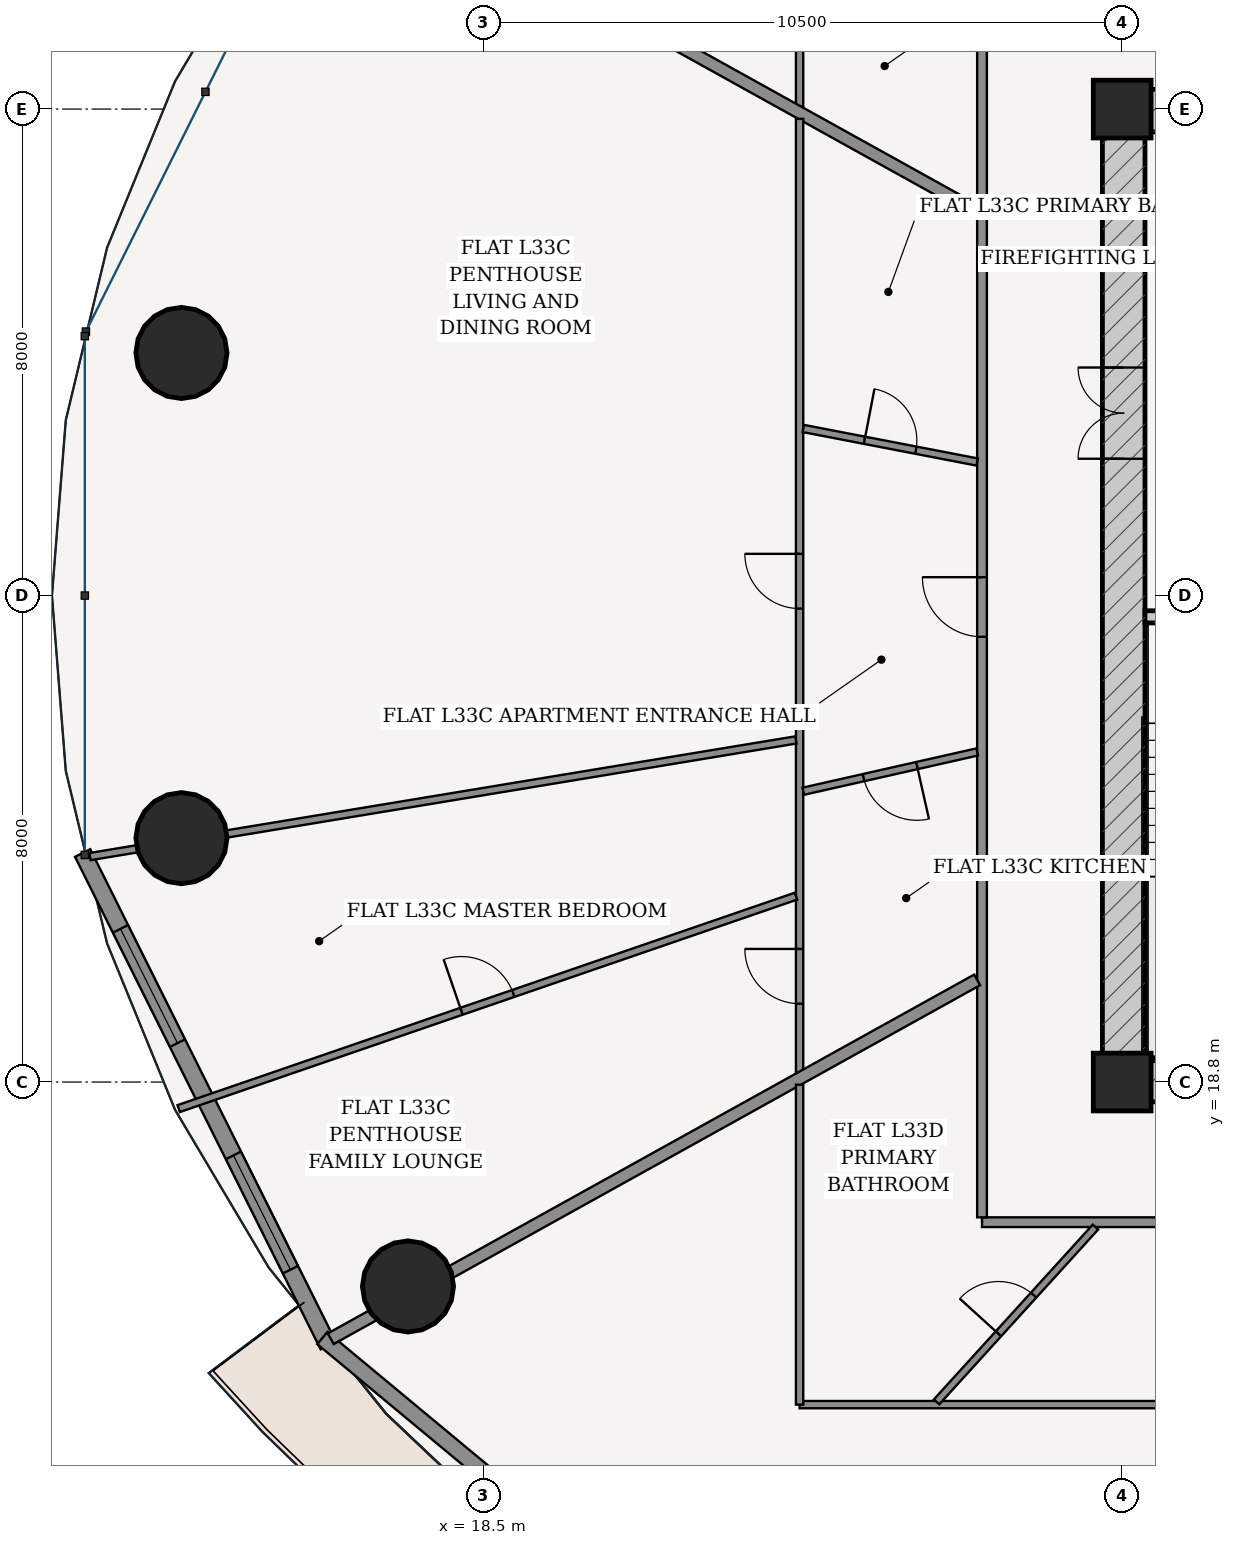
"""IFC4 building model, lengths in metres.
Left out: names, types, materials, properties, quantities, classifications, styles, units other than length and angle.
Written with IfcOpenShell. Run it as: python <this file> out.ifc"""

import sys

from ifc_helpers import new_model, si_unit, direction, frame, frame_2d, origin, origin_2d, place, context, subcontext, project, spatial, rectangle, hollow_circle, extrude, source, transform, mapped, element, fill, save


model = new_model("IFC4")
c1 = context("Model", 3, precision=1e-05, world=origin(), true_north=direction((-0.2419218956, 0.970295726276)))
c2 = subcontext(c1, "Body", "Model", "MODEL_VIEW")
j1 = project(units=[si_unit("LENGTHUNIT", "METRE"), si_unit("PLANEANGLEUNIT", "RADIAN")], contexts=[c1])
p1 = place(None, origin())
s1 = spatial("IfcSite", under=j1, at=p1, CompositionType="ELEMENT")
p2 = place(p1, origin())
s2 = spatial("IfcBuilding", under=s1, at=p2, CompositionType="ELEMENT")
p3 = place(p2, frame((0.0, 0.0, 126.6)))
s3 = spatial("IfcBuildingStorey", under=s2, at=p3, CompositionType="ELEMENT", Elevation=126.6)
for number, where, z_axis, x_axis in (
    (1, (29.0, 18.8, 0.0), (0.0, 0.0, 1.0), (1.0, 0.0, 0.0)),
    (2, (29.0, 34.8, 0.0), (0.0, 0.0, 1.0), (1.0, 0.0, 0.0)),
):
    element("IfcColumn", number, at=place(p3, frame(where, z_axis=z_axis, x_axis=x_axis)), inside=s3, PredefinedType="COLUMN", context=c2, shape_type="SweptSolid", body=[
        extrude(rectangle(XDim=0.95, YDim=0.95, at=origin_2d()), origin(), (0.0, 0.0, 1.0), 3.6),
    ])
p4 = place(p3, frame((28.675, 18.825, 0.0), z_axis=(0.0, 0.0, 1.0), x_axis=(1.0, 0.0, 0.0)))
e3 = element("IfcWall", 3, at=p4, inside=s3, PredefinedType="SHEAR", context=c2, shape_type="SweptSolid", body=[
    extrude(rectangle(XDim=18.65, YDim=0.7, at=frame_2d((9.325, 0.0))), origin(), (0.0, 0.0, 1.0), 3.15),
])
p5 = place(p4, frame((8.9, 0.0, 0.0)))
e4 = element("IfcOpeningElement", 4, at=p5, cuts=e3, PredefinedType="OPENING", context=c2, shape_type="SweptSolid", body=[
    extrude(rectangle(XDim=0.85, YDim=2.1, at=frame_2d((0.425, 1.05))), frame((0.0, 0.36, 0.0), z_axis=(0.0, -1.0, 0.0), x_axis=(1.0, 0.0, 0.0)), (0.0, 0.0, 1.0), 0.72),
])
p6 = place(p3, frame((28.675, 34.775, 0.0), z_axis=(0.0, 0.0, 1.0), x_axis=(1.0, 0.0, 0.0)))
e5 = element("IfcWall", 5, at=p6, inside=s3, PredefinedType="SHEAR", context=c2, shape_type="SweptSolid", body=[
    extrude(rectangle(XDim=18.65, YDim=0.7, at=frame_2d((9.325, 0.0))), origin(), (0.0, 0.0, 1.0), 3.15),
])
p7 = place(p6, frame((8.9, 0.0, 0.0)))
e6 = element("IfcOpeningElement", 6, at=p7, cuts=e5, PredefinedType="OPENING", context=c2, shape_type="SweptSolid", body=[
    extrude(rectangle(XDim=0.85, YDim=2.1, at=frame_2d((0.425, 1.05))), frame((0.0, 0.36, 0.0), z_axis=(0.0, -1.0, 0.0), x_axis=(1.0, 0.0, 0.0)), (0.0, 0.0, 1.0), 0.72),
])
p8 = place(p3, frame((29.025, 19.175, 0.0), z_axis=(0.0, 0.0, 1.0), x_axis=(0.0, 1.0, 0.0)))
e7 = element("IfcWall", 7, at=p8, inside=s3, PredefinedType="SHEAR", context=c2, shape_type="SweptSolid", body=[
    extrude(rectangle(XDim=15.25, YDim=0.7, at=frame_2d((7.625, 0.0))), origin(), (0.0, 0.0, 1.0), 3.15),
])
p9 = place(p8, frame((9.875, 0.0, 0.0)))
e8 = element("IfcOpeningElement", 8, at=p9, cuts=e7, PredefinedType="OPENING", context=c2, shape_type="SweptSolid", body=[
    extrude(rectangle(XDim=1.5, YDim=2.2, at=frame_2d((0.75, 1.1))), frame((0.0, 0.36, 0.0), z_axis=(0.0, -1.0, 0.0), x_axis=(1.0, 0.0, 0.0)), (0.0, 0.0, 1.0), 0.72),
])
p10 = place(p3, frame((29.375, 26.45, 0.0), z_axis=(0.0, 0.0, 1.0), x_axis=(1.0, 0.0, 0.0)))
e9 = element("IfcWall", 9, at=p10, inside=s3, PredefinedType="SOLIDWALL", context=c2, shape_type="SweptSolid", body=[
    extrude(rectangle(XDim=3.32, YDim=0.2, at=frame_2d((1.66, 0.0))), origin(), (0.0, 0.0, 1.0), 3.15),
])
p11 = place(p10, frame((1.185, 0.0, 0.0)))
e10 = element("IfcOpeningElement", 10, at=p11, cuts=e9, PredefinedType="OPENING", context=c2, shape_type="SweptSolid", body=[
    extrude(rectangle(XDim=0.95, YDim=2.15, at=frame_2d((0.475, 1.075))), frame((0.0, 0.11, 0.0), z_axis=(0.0, -1.0, 0.0), x_axis=(1.0, 0.0, 0.0)), (0.0, 0.0, 1.0), 0.22),
])
for number, where, z_axis, x_axis in (
    (11, (13.529, 30.79, 0.0), (0.0, 0.0, 1.0), (1.0, 0.0, 0.0)),
    (12, (13.529, 22.81, 0.0), (0.0, 0.0, 1.0), (1.0, 0.0, 0.0)),
    (13, (17.255, 15.438, 0.0), (0.0, 0.0, 1.0), (1.0, 0.0, 0.0)),
):
    element("IfcColumn", number, at=place(p3, frame(where, z_axis=z_axis, x_axis=x_axis)), inside=s3, PredefinedType="COLUMN", context=c2, shape_type="SweptSolid", body=[
        extrude(hollow_circle(Radius=0.75, WallThickness=0.045, at=origin_2d()), origin(), (0.0, 0.0, 1.0), 3.6),
    ])
p12 = place(p3, frame((11.905, 22.566, 0.0), z_axis=(0.0, 0.0, 1.0), x_axis=(0.446274562077, -0.894896091869, 0.0)))
e14 = element("IfcWall", 14, at=p12, inside=s3, PredefinedType="SOLIDWALL", context=c2, shape_type="SweptSolid", body=[
    extrude(rectangle(XDim=9.05, YDim=0.28, at=frame_2d((4.525, 0.0))), origin(), (0.0, 0.0, 1.0), 3.15),
])
p13 = place(p12, frame((1.394, 0.0, 0.85)))
e15 = element("IfcOpeningElement", 15, at=p13, cuts=e14, PredefinedType="OPENING", context=c2, shape_type="SweptSolid", body=[
    extrude(rectangle(XDim=2.1, YDim=1.95, at=frame_2d((1.05, 0.975))), frame((0.0, 0.15, 0.0), z_axis=(0.0, -1.0, 0.0), x_axis=(1.0, 0.0, 0.0)), (0.0, 0.0, 1.0), 0.3),
])
p14 = place(p12, frame((5.557, 0.0, 0.85)))
e16 = element("IfcOpeningElement", 16, at=p14, cuts=e14, PredefinedType="OPENING", context=c2, shape_type="SweptSolid", body=[
    extrude(rectangle(XDim=2.1, YDim=1.95, at=frame_2d((1.05, 0.975))), frame((0.0, 0.15, 0.0), z_axis=(0.0, -1.0, 0.0), x_axis=(1.0, 0.0, 0.0)), (0.0, 0.0, 1.0), 0.3),
])
p15 = place(p3, frame((15.846, 14.59, 0.0), z_axis=(0.0, 0.0, 1.0), x_axis=(0.769254958887, -0.638941944333, 0.0)))
e17 = element("IfcWall", 17, at=p15, inside=s3, PredefinedType="SOLIDWALL", context=c2, shape_type="SweptSolid", body=[
    extrude(rectangle(XDim=9.69, YDim=0.26, at=frame_2d((4.845, 0.0))), origin(), (0.0, 0.0, 1.0), 3.15),
])
p16 = place(p15, frame((4.17, 0.0, 0.0)))
e18 = element("IfcOpeningElement", 18, at=p16, cuts=e17, PredefinedType="OPENING", context=c2, shape_type="SweptSolid", body=[
    extrude(rectangle(XDim=1.35, YDim=2.2, at=frame_2d((0.675, 1.1))), frame((0.0, 0.14, 0.0), z_axis=(0.0, -1.0, 0.0), x_axis=(1.0, 0.0, 0.0)), (0.0, 0.0, 1.0), 0.28),
])
p17 = place(p3, frame((26.695, 16.495, 0.0), z_axis=(0.0, 0.0, 1.0), x_axis=(1.0, 0.0, 0.0)))
e19 = element("IfcWall", 19, at=p17, inside=s3, PredefinedType="PARTITIONING", context=c2, shape_type="SweptSolid", body=[
    extrude(rectangle(XDim=22.61, YDim=0.16, at=frame_2d((11.305, 0.0))), origin(), (0.0, 0.0, 1.0), 2.596),
])
p18 = place(p17, frame((4.883, 0.0, 0.0)))
e20 = element("IfcOpeningElement", 20, at=p18, cuts=e19, PredefinedType="OPENING", context=c2, shape_type="SweptSolid", body=[
    extrude(rectangle(XDim=0.98, YDim=2.2, at=frame_2d((0.49, 1.1))), frame((0.0, 0.09, 0.0), z_axis=(0.0, -1.0, 0.0), x_axis=(1.0, 0.0, 0.0)), (0.0, 0.0, 1.0), 0.18),
])
p19 = place(p3, frame((26.695, 16.575, 0.0), z_axis=(0.0, 0.0, 1.0), x_axis=(0.0, 1.0, 0.0)))
e21 = element("IfcWall", 21, at=p19, inside=s3, PredefinedType="PARTITIONING", context=c2, shape_type="SweptSolid", body=[
    extrude(rectangle(XDim=20.45, YDim=0.16, at=frame_2d((10.225, 0.0))), origin(), (0.0, 0.0, 1.0), 2.596),
])
p20 = place(p19, frame((9.547, 0.0, 0.0)))
e22 = element("IfcOpeningElement", 22, at=p20, cuts=e21, PredefinedType="OPENING", context=c2, shape_type="SweptSolid", body=[
    extrude(rectangle(XDim=0.98, YDim=2.2, at=frame_2d((0.49, 1.1))), frame((0.0, 0.09, 0.0), z_axis=(0.0, -1.0, 0.0), x_axis=(1.0, 0.0, 0.0)), (0.0, 0.0, 1.0), 0.18),
])
p21 = place(p3, frame((23.695, 34.843, 0.0), z_axis=(0.0, 0.0, 1.0), x_axis=(0.0, 1.0, 0.0)))
e23 = element("IfcWall", 23, at=p21, inside=s3, PredefinedType="PARTITIONING", context=c2, shape_type="SweptSolid", body=[
    extrude(rectangle(XDim=5.262, YDim=0.12, at=frame_2d((2.631, 0.0))), origin(), (0.0, 0.0, 1.0), 2.596),
])
p22 = place(p21, frame((2.181, 0.0, 0.0)))
e24 = element("IfcOpeningElement", 24, at=p22, cuts=e23, PredefinedType="OPENING", context=c2, shape_type="SweptSolid", body=[
    extrude(rectangle(XDim=0.9, YDim=2.15, at=frame_2d((0.45, 1.075))), frame((0.0, 0.07, 0.0), z_axis=(0.0, -1.0, 0.0), x_axis=(1.0, 0.0, 0.0)), (0.0, 0.0, 1.0), 0.14),
])
p23 = place(p3, frame((26.615, 33.12, 0.0), z_axis=(0.0, 0.0, 1.0), x_axis=(-0.874319192772, 0.485351366692, 0.0)))
e25 = element("IfcWall", 25, at=p23, inside=s3, PredefinedType="PARTITIONING", context=c2, shape_type="SweptSolid", body=[
    extrude(rectangle(XDim=12.158, YDim=0.2, at=frame_2d((6.079, 0.0))), origin(), (0.0, 0.0, 1.0), 2.5),
])
p24 = place(p3, frame((23.695, 18.961, 0.0), z_axis=(0.0, 0.0, 1.0), x_axis=(0.0, 1.0, 0.0)))
e26 = element("IfcWall", 26, at=p24, inside=s3, PredefinedType="PARTITIONING", context=c2, shape_type="SweptSolid", body=[
    extrude(rectangle(XDim=15.679, YDim=0.12, at=frame_2d((7.839, 0.0))), origin(), (0.0, 0.0, 1.0), 2.596),
])
p25 = place(p24, frame((7.625, 0.0, 0.0)))
e27 = element("IfcOpeningElement", 27, at=p25, cuts=e26, PredefinedType="OPENING", context=c2, shape_type="SweptSolid", body=[
    extrude(rectangle(XDim=0.9, YDim=2.15, at=frame_2d((0.45, 1.075))), frame((0.0, 0.07, 0.0), z_axis=(0.0, -1.0, 0.0), x_axis=(1.0, 0.0, 0.0)), (0.0, 0.0, 1.0), 0.14),
])
p26 = place(p24, frame((1.128, 0.0, 0.0)))
e28 = element("IfcOpeningElement", 28, at=p26, cuts=e26, PredefinedType="OPENING", context=c2, shape_type="SweptSolid", body=[
    extrude(rectangle(XDim=0.9, YDim=2.15, at=frame_2d((0.45, 1.075))), frame((0.0, 0.07, 0.0), z_axis=(0.0, -1.0, 0.0), x_axis=(1.0, 0.0, 0.0)), (0.0, 0.0, 1.0), 0.14),
])
p27 = place(p3, frame((23.634, 24.426, 0.0), z_axis=(0.0, 0.0, 1.0), x_axis=(-0.986619012175, -0.163042708564, 0.0)))
e29 = element("IfcWall", 29, at=p27, inside=s3, PredefinedType="PARTITIONING", context=c2, shape_type="SweptSolid", body=[
    extrude(rectangle(XDim=11.765, YDim=0.12, at=frame_2d((5.883, 0.0))), origin(), (0.0, 0.0, 1.0), 2.5),
])
p28 = place(p3, frame((23.636, 21.857, 0.0), z_axis=(0.0, 0.0, 1.0), x_axis=(-0.945571197348, -0.325415289661, 0.0)))
e30 = element("IfcWall", 30, at=p28, inside=s3, PredefinedType="PARTITIONING", context=c2, shape_type="SweptSolid", body=[
    extrude(rectangle(XDim=10.737, YDim=0.12, at=frame_2d((5.368, 0.0))), origin(), (0.0, 0.0, 1.0), 2.666),
])
p29 = place(p28, frame((4.918, 0.0, 0.0)))
e31 = element("IfcOpeningElement", 31, at=p29, cuts=e30, PredefinedType="OPENING", context=c2, shape_type="SweptSolid", body=[
    extrude(rectangle(XDim=0.9, YDim=2.15, at=frame_2d((0.45, 1.075))), frame((0.0, 0.07, 0.0), z_axis=(0.0, -1.0, 0.0), x_axis=(1.0, 0.0, 0.0)), (0.0, 0.0, 1.0), 0.14),
])
p30 = place(p3, frame((26.615, 28.996, 0.0), z_axis=(0.0, 0.0, 1.0), x_axis=(-0.98189924136, 0.189404012145, 0.0)))
e32 = element("IfcWall", 32, at=p30, inside=s3, PredefinedType="PARTITIONING", context=c2, shape_type="SweptSolid", body=[
    extrude(rectangle(XDim=2.912, YDim=0.12, at=frame_2d((1.456, 0.0))), origin(), (0.0, 0.0, 1.0), 3.15),
])
p31 = place(p30, frame((1.026, 0.0, 0.0)))
e33 = element("IfcOpeningElement", 33, at=p31, cuts=e32, PredefinedType="OPENING", context=c2, shape_type="SweptSolid", body=[
    extrude(rectangle(XDim=0.86, YDim=2.15, at=frame_2d((0.43, 1.075))), frame((0.0, 0.07, 0.0), z_axis=(0.0, -1.0, 0.0), x_axis=(1.0, 0.0, 0.0)), (0.0, 0.0, 1.0), 0.14),
])
p32 = place(p3, frame((26.615, 24.228, 0.0), z_axis=(0.0, 0.0, 1.0), x_axis=(-0.975420797165, -0.220350331196, 0.0)))
e34 = element("IfcWall", 34, at=p32, inside=s3, PredefinedType="PARTITIONING", context=c2, shape_type="SweptSolid", body=[
    extrude(rectangle(XDim=2.932, YDim=0.12, at=frame_2d((1.466, 0.0))), origin(), (0.0, 0.0, 1.0), 3.15),
])
p33 = place(p32, frame((1.016, 0.0, 0.0)))
e35 = element("IfcOpeningElement", 35, at=p33, cuts=e34, PredefinedType="OPENING", context=c2, shape_type="SweptSolid", body=[
    extrude(rectangle(XDim=0.9, YDim=2.15, at=frame_2d((0.45, 1.075))), frame((0.0, 0.07, 0.0), z_axis=(0.0, -1.0, 0.0), x_axis=(1.0, 0.0, 0.0)), (0.0, 0.0, 1.0), 0.14),
])
p34 = place(p3, frame((26.615, 20.48, 0.0), z_axis=(0.0, 0.0, 1.0), x_axis=(-0.874310671773, -0.48536671623, 0.0)))
e36 = element("IfcWall", 36, at=p34, inside=s3, PredefinedType="PARTITIONING", context=c2, shape_type="SweptSolid", body=[
    extrude(rectangle(XDim=12.159, YDim=0.2, at=frame_2d((6.079, 0.0))), origin(), (0.0, 0.0, 1.0), 2.5),
])
p35 = place(p3, frame((48.598, 13.495, 0.0), z_axis=(0.0, 0.0, 1.0), x_axis=(-1.0, 0.0, 0.0)))
e37 = element("IfcWall", 37, at=p35, inside=s3, PredefinedType="PARTITIONING", context=c2, shape_type="SweptSolid", body=[
    extrude(rectangle(XDim=24.903, YDim=0.12, at=frame_2d((12.452, 0.0))), origin(), (0.0, 0.0, 1.0), 2.596),
])
p36 = place(p35, frame((17.72, 0.0, 0.0)))
e38 = element("IfcOpeningElement", 38, at=p36, cuts=e37, PredefinedType="OPENING", context=c2, shape_type="SweptSolid", body=[
    extrude(rectangle(XDim=0.9, YDim=2.15, at=frame_2d((0.45, 1.075))), frame((0.0, 0.07, 0.0), z_axis=(0.0, -1.0, 0.0), x_axis=(1.0, 0.0, 0.0)), (0.0, 0.0, 1.0), 0.14),
])
p37 = place(p35, frame((11.637, 0.0, 0.0)))
e39 = element("IfcOpeningElement", 39, at=p37, cuts=e37, PredefinedType="OPENING", context=c2, shape_type="SweptSolid", body=[
    extrude(rectangle(XDim=0.9, YDim=2.15, at=frame_2d((0.45, 1.075))), frame((0.0, 0.07, 0.0), z_axis=(0.0, -1.0, 0.0), x_axis=(1.0, 0.0, 0.0)), (0.0, 0.0, 1.0), 0.14),
])
p38 = place(p35, frame((3.376, 0.0, 0.0)))
e40 = element("IfcOpeningElement", 40, at=p38, cuts=e37, PredefinedType="OPENING", context=c2, shape_type="SweptSolid", body=[
    extrude(rectangle(XDim=0.9, YDim=2.15, at=frame_2d((0.45, 1.075))), frame((0.0, 0.07, 0.0), z_axis=(0.0, -1.0, 0.0), x_axis=(1.0, 0.0, 0.0)), (0.0, 0.0, 1.0), 0.14),
])
p39 = place(p3, frame((23.695, 13.495, 0.0), z_axis=(0.0, 0.0, 1.0), x_axis=(0.0, 1.0, 0.0)))
e41 = element("IfcWall", 41, at=p39, inside=s3, PredefinedType="PARTITIONING", context=c2, shape_type="SweptSolid", body=[
    extrude(rectangle(XDim=5.261, YDim=0.12, at=frame_2d((2.631, 0.0))), origin(), (0.0, 0.0, 1.0), 2.596),
])
p40 = place(p3, frame((28.561, 16.415, 0.0), z_axis=(0.0, 0.0, 1.0), x_axis=(-0.672578928456, -0.740025394833, 0.0)))
e42 = element("IfcWall", 42, at=p40, inside=s3, PredefinedType="PARTITIONING", context=c2, shape_type="SweptSolid", body=[
    extrude(rectangle(XDim=3.884, YDim=0.12, at=frame_2d((1.942, 0.0))), origin(), (0.0, 0.0, 1.0), 2.596),
])
p41 = place(p40, frame((1.512, 0.0, 0.0)))
e43 = element("IfcOpeningElement", 43, at=p41, cuts=e42, PredefinedType="OPENING", context=c2, shape_type="SweptSolid", body=[
    extrude(rectangle(XDim=0.86, YDim=2.15, at=frame_2d((0.43, 1.075))), frame((0.0, 0.07, 0.0), z_axis=(0.0, -1.0, 0.0), x_axis=(1.0, 0.0, 0.0)), (0.0, 0.0, 1.0), 0.14),
])
m1 = source(origin(), c2, "Body", "SweptSolid", [
    extrude(rectangle(XDim=2.1, YDim=1.95, at=frame_2d((1.05, 0.975))), frame((0.0, 0.03, 0.0), z_axis=(0.0, -1.0, 0.0), x_axis=(1.0, 0.0, 0.0)), (0.0, 0.0, 1.0), 0.06),
])
p42 = place(p13, origin())
e44 = element("IfcWindow", 44, at=p42, inside=s3, PartitioningType="SINGLE_PANEL", PredefinedType="WINDOW", context=c2, shape_type="MappedRepresentation", body=[
    mapped(m1, transform((0.0, 0.0, 0.0), scale=1.0)),
])
fill(e15, e44)
p43 = place(p14, origin())
e45 = element("IfcWindow", 45, at=p43, inside=s3, PartitioningType="SINGLE_PANEL", PredefinedType="WINDOW", context=c2, shape_type="MappedRepresentation", body=[
    mapped(m1, transform((0.0, 0.0, 0.0), scale=1.0)),
])
fill(e16, e45)
m2 = source(origin(), c2, "Body", "SweptSolid", [
    extrude(rectangle(XDim=1.5, YDim=2.2, at=frame_2d((0.75, 1.1))), frame((0.0, 0.025, 0.0), z_axis=(0.0, -1.0, 0.0), x_axis=(1.0, 0.0, 0.0)), (0.0, 0.0, 1.0), 0.05),
])
p44 = place(p9, origin())
e46 = element("IfcDoor", 46, at=p44, inside=s3, OperationType="DOUBLE_DOOR_SINGLE_SWING", PredefinedType="DOOR", context=c2, shape_type="MappedRepresentation", body=[
    mapped(m2, transform((0.0, 0.0, 0.0), scale=1.0)),
])
fill(e8, e46)
m3 = source(origin(), c2, "Body", "SweptSolid", [
    extrude(rectangle(XDim=0.98, YDim=2.2, at=frame_2d((0.49, 1.1))), frame((0.0, 0.025, 0.0), z_axis=(0.0, -1.0, 0.0), x_axis=(1.0, 0.0, 0.0)), (0.0, 0.0, 1.0), 0.05),
])
p45 = place(p20, origin())
e47 = element("IfcDoor", 47, at=p45, inside=s3, OperationType="SINGLE_SWING_RIGHT", PredefinedType="DOOR", context=c2, shape_type="MappedRepresentation", body=[
    mapped(m3, transform((0.0, 0.0, 0.0), scale=1.0)),
])
fill(e22, e47)
m4 = source(origin(), c2, "Body", "SweptSolid", [
    extrude(rectangle(XDim=0.86, YDim=2.15, at=frame_2d((0.43, 1.075))), frame((0.0, 0.025, 0.0), z_axis=(0.0, -1.0, 0.0), x_axis=(1.0, 0.0, 0.0)), (0.0, 0.0, 1.0), 0.05),
])
p46 = place(p31, frame((0.86, 0.0, 0.0), z_axis=(0.0, 0.0, 1.0), x_axis=(-1.0, 0.0, 0.0)))
e48 = element("IfcDoor", 48, at=p46, inside=s3, OperationType="SINGLE_SWING_LEFT", PredefinedType="DOOR", context=c2, shape_type="MappedRepresentation", body=[
    mapped(m4, transform((0.0, 0.0, 0.0), scale=1.0)),
])
fill(e33, e48)
m5 = source(origin(), c2, "Body", "SweptSolid", [
    extrude(rectangle(XDim=0.9, YDim=2.15, at=frame_2d((0.45, 1.075))), frame((0.0, 0.025, 0.0), z_axis=(0.0, -1.0, 0.0), x_axis=(1.0, 0.0, 0.0)), (0.0, 0.0, 1.0), 0.05),
])
p47 = place(p25, origin())
e49 = element("IfcDoor", 49, at=p47, inside=s3, OperationType="SINGLE_SWING_RIGHT", PredefinedType="DOOR", context=c2, shape_type="MappedRepresentation", body=[
    mapped(m5, transform((0.0, 0.0, 0.0), scale=1.0)),
])
fill(e27, e49)
p48 = place(p33, origin())
e50 = element("IfcDoor", 50, at=p48, inside=s3, OperationType="SINGLE_SWING_LEFT", PredefinedType="DOOR", context=c2, shape_type="MappedRepresentation", body=[
    mapped(m5, transform((0.0, 0.0, 0.0), scale=1.0)),
])
fill(e35, e50)
p49 = place(p26, origin())
e51 = element("IfcDoor", 51, at=p49, inside=s3, OperationType="SINGLE_SWING_RIGHT", PredefinedType="DOOR", context=c2, shape_type="MappedRepresentation", body=[
    mapped(m5, transform((0.0, 0.0, 0.0), scale=1.0)),
])
fill(e28, e51)
p50 = place(p29, frame((0.9, 0.0, 0.0), z_axis=(0.0, 0.0, 1.0), x_axis=(-1.0, 0.0, 0.0)))
e52 = element("IfcDoor", 52, at=p50, inside=s3, OperationType="SINGLE_SWING_LEFT", PredefinedType="DOOR", context=c2, shape_type="MappedRepresentation", body=[
    mapped(m5, transform((0.0, 0.0, 0.0), scale=1.0)),
])
fill(e31, e52)
p51 = place(p41, frame((0.86, 0.0, 0.0), z_axis=(0.0, 0.0, 1.0), x_axis=(-1.0, 0.0, 0.0)))
e53 = element("IfcDoor", 53, at=p51, inside=s3, OperationType="SINGLE_SWING_LEFT", PredefinedType="DOOR", context=c2, shape_type="MappedRepresentation", body=[
    mapped(m4, transform((0.0, 0.0, 0.0), scale=1.0)),
])
fill(e43, e53)
save(model, sys.argv[1])
